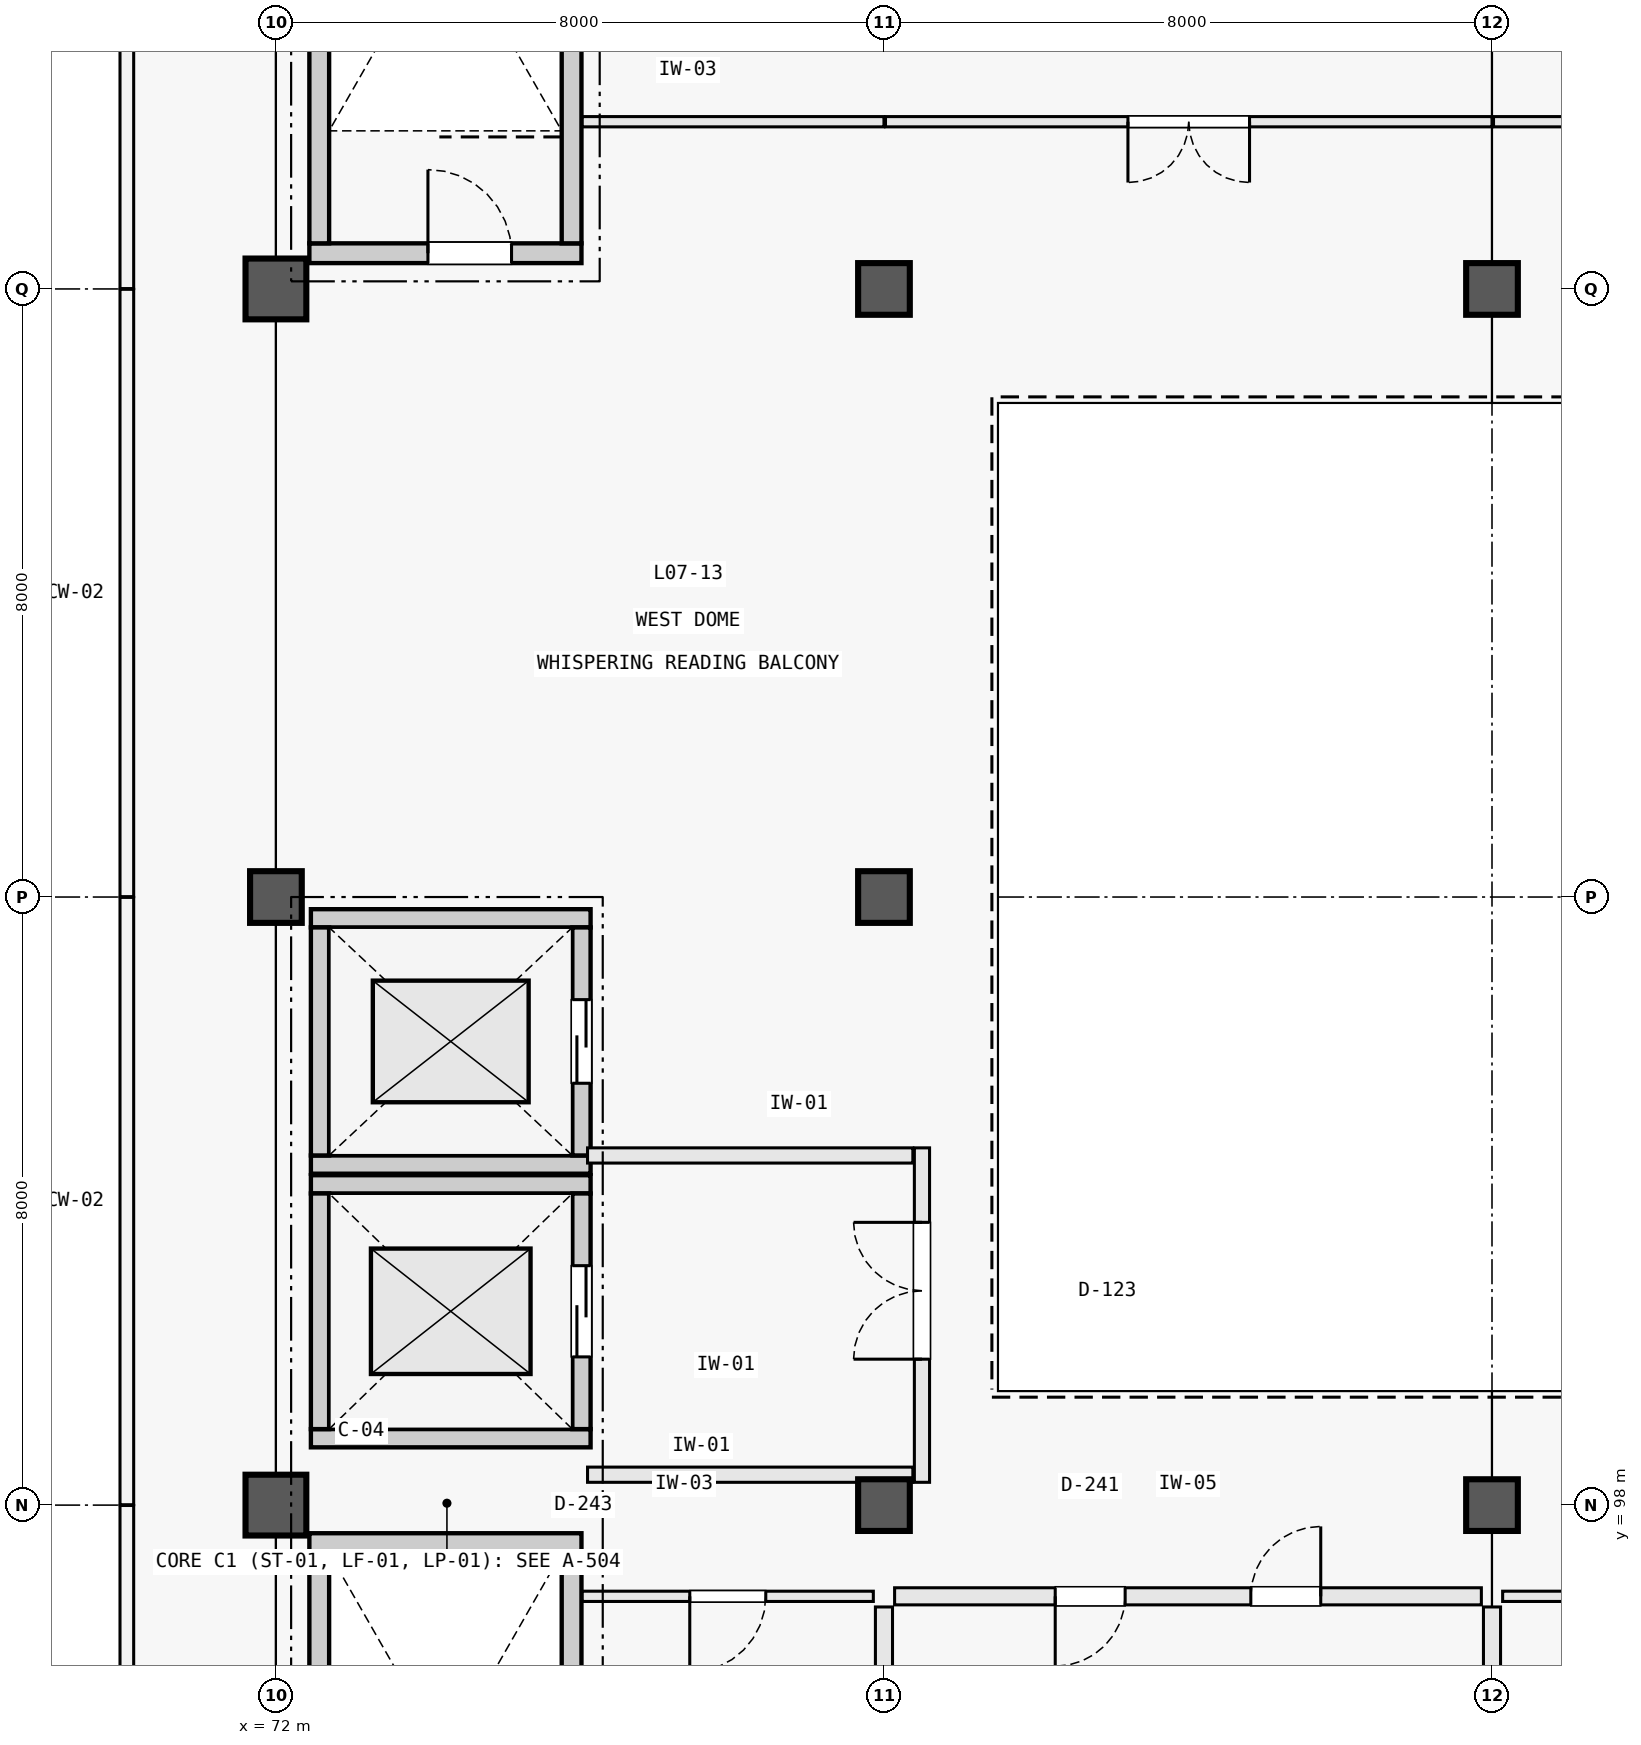
"""IFC4 building model, lengths in metres.
Left out: names, types, materials, properties, quantities, classifications, styles, units other than length and angle.
Written with IfcOpenShell. Run it as: python <this file> out.ifc"""

import sys

from ifc_helpers import new_model, si_unit, direction, frame, frame_2d, origin, origin_2d, place, context, subcontext, project, spatial, rectangle, circle, extrude, element, fill, save


model = new_model("IFC4")
c1 = context("Model", 3, precision=1e-05, world=origin(), true_north=direction((0.0, 1.0)))
c2 = subcontext(c1, "Body", "Model", "MODEL_VIEW")
j1 = project(units=[si_unit("LENGTHUNIT", "METRE"), si_unit("PLANEANGLEUNIT", "RADIAN")], contexts=[c1])
p1 = place(None, origin())
s1 = spatial("IfcSite", under=j1, at=p1, CompositionType="ELEMENT")
p2 = place(p1, origin())
s2 = spatial("IfcBuilding", under=s1, at=p2, CompositionType="ELEMENT")
p3 = place(p2, frame((0.0, 0.0, 30.3)))
s3 = spatial("IfcBuildingStorey", under=s2, at=p3, CompositionType="ELEMENT", Elevation=30.3)
p4 = place(p3, frame((72.0, 98.0, 0.0), z_axis=(0.0, 0.0, 1.0), x_axis=(1.0, 0.0, 0.0)))
e1 = element("IfcColumn", 1, at=p4, inside=s3, PredefinedType="COLUMN", context=c2, shape_type="SweptSolid", body=[
    extrude(rectangle(XDim=0.8, YDim=0.8, at=origin_2d()), origin(), (0.0, 0.0, 1.0), 4.5),
])
p5 = place(p3, frame((72.0, 106.0, 0.0), z_axis=(0.0, 0.0, 1.0), x_axis=(1.0, 0.0, 0.0)))
e2 = element("IfcColumn", 2, at=p5, inside=s3, PredefinedType="COLUMN", context=c2, shape_type="SweptSolid", body=[
    extrude(circle(Radius=0.34, at=origin_2d()), origin(), (0.0, 0.0, 1.0), 4.5),
])
p6 = place(p3, frame((72.0, 114.0, 0.0), z_axis=(0.0, 0.0, 1.0), x_axis=(1.0, 0.0, 0.0)))
e3 = element("IfcColumn", 3, at=p6, inside=s3, PredefinedType="COLUMN", context=c2, shape_type="SweptSolid", body=[
    extrude(rectangle(XDim=0.8, YDim=0.8, at=origin_2d()), origin(), (0.0, 0.0, 1.0), 4.5),
])
for number, where, z_axis, x_axis in (
    (4, (80.0, 98.0, 0.0), (0.0, 0.0, 1.0), (1.0, 0.0, 0.0)),
    (5, (80.0, 106.0, 0.0), (0.0, 0.0, 1.0), (1.0, 0.0, 0.0)),
    (6, (80.0, 114.0, 0.0), (0.0, 0.0, 1.0), (1.0, 0.0, 0.0)),
    (7, (88.0, 98.0, 0.0), (0.0, 0.0, 1.0), (1.0, 0.0, 0.0)),
    (8, (88.0, 114.0, 0.0), (0.0, 0.0, 1.0), (1.0, 0.0, 0.0)),
):
    element("IfcColumn", number, at=place(p3, frame(where, z_axis=z_axis, x_axis=x_axis)), inside=s3, PredefinedType="COLUMN", context=c2, shape_type="SweptSolid", body=[
        extrude(circle(Radius=0.34, at=origin_2d()), origin(), (0.0, 0.0, 1.0), 4.5),
    ])
p7 = place(p3, frame((72.44, 97.5, 0.0), z_axis=(0.0, 0.0, 1.0), x_axis=(1.0, 0.0, 0.0)))
e9 = element("IfcWall", 9, at=p7, inside=s3, PredefinedType="SOLIDWALL", context=c2, shape_type="SweptSolid", body=[
    extrude(rectangle(XDim=3.58, YDim=0.26, at=frame_2d((1.79, 0.0))), origin(), (0.0, 0.0, 1.0), 4.5),
])
for number, where, z_axis, x_axis in (
    (10, (72.57, 90.55, 0.0), (0.0, 0.0, 1.0), (0.0, 1.0, 0.0)),
    (11, (75.89, 90.55, 0.0), (0.0, 0.0, 1.0), (0.0, 1.0, 0.0)),
):
    element("IfcWall", number, at=place(p3, frame(where, z_axis=z_axis, x_axis=x_axis)), inside=s3, PredefinedType="SOLIDWALL", context=c2, shape_type="SweptSolid", body=[
        extrude(rectangle(XDim=6.82, YDim=0.26, at=frame_2d((3.41, 0.0))), origin(), (0.0, 0.0, 1.0), 4.5),
    ])
p8 = place(p3, frame((72.44, 114.47, 0.0), z_axis=(0.0, 0.0, 1.0), x_axis=(1.0, 0.0, 0.0)))
e12 = element("IfcWall", 12, at=p8, inside=s3, PredefinedType="SOLIDWALL", context=c2, shape_type="SweptSolid", body=[
    extrude(rectangle(XDim=3.58, YDim=0.26, at=frame_2d((1.79, 0.0))), origin(), (0.0, 0.0, 1.0), 4.5),
])
p9 = place(p8, frame((1.56, 0.0, 0.0)))
e13 = element("IfcOpeningElement", 13, at=p9, cuts=e12, PredefinedType="OPENING", context=c2, shape_type="SweptSolid", body=[
    extrude(rectangle(XDim=1.1, YDim=2.2, at=frame_2d((0.55, 1.1))), frame((0.0, 0.142, 0.0), z_axis=(0.0, -1.0, 0.0), x_axis=(1.0, 0.0, 0.0)), (0.0, 0.0, 1.0), 0.284),
])
for number, where, z_axis, x_axis in (
    (14, (72.57, 114.6, 0.0), (0.0, 0.0, 1.0), (0.0, 1.0, 0.0)),
    (15, (75.89, 114.6, 0.0), (0.0, 0.0, 1.0), (0.0, 1.0, 0.0)),
):
    element("IfcWall", number, at=place(p3, frame(where, z_axis=z_axis, x_axis=x_axis)), inside=s3, PredefinedType="SOLIDWALL", context=c2, shape_type="SweptSolid", body=[
        extrude(rectangle(XDim=6.82, YDim=0.26, at=frame_2d((3.41, 0.0))), origin(), (0.0, 0.0, 1.0), 4.5),
    ])
for number, where, z_axis, x_axis in (
    (16, (72.46, 98.88, 0.0), (0.0, 0.0, 1.0), (1.0, 0.0, 0.0)),
    (17, (72.46, 102.22, 0.0), (0.0, 0.0, 1.0), (1.0, 0.0, 0.0)),
):
    element("IfcWall", number, at=place(p3, frame(where, z_axis=z_axis, x_axis=x_axis)), inside=s3, PredefinedType="SOLIDWALL", context=c2, shape_type="SweptSolid", body=[
        extrude(rectangle(XDim=3.68, YDim=0.24, at=frame_2d((1.84, 0.0))), origin(), (0.0, 0.0, 1.0), 4.5),
    ])
p10 = place(p3, frame((72.58, 99.0, 0.0), z_axis=(0.0, 0.0, 1.0), x_axis=(0.0, 1.0, 0.0)))
e18 = element("IfcWall", 18, at=p10, inside=s3, PredefinedType="SOLIDWALL", context=c2, shape_type="SweptSolid", body=[
    extrude(rectangle(XDim=3.1, YDim=0.24, at=frame_2d((1.55, 0.0))), origin(), (0.0, 0.0, 1.0), 4.5),
])
p11 = place(p3, frame((76.02, 99.0, 0.0), z_axis=(0.0, 0.0, 1.0), x_axis=(0.0, 1.0, 0.0)))
e19 = element("IfcWall", 19, at=p11, inside=s3, PredefinedType="SOLIDWALL", context=c2, shape_type="SweptSolid", body=[
    extrude(rectangle(XDim=3.1, YDim=0.24, at=frame_2d((1.55, 0.0))), origin(), (0.0, 0.0, 1.0), 4.5),
])
p12 = place(p11, frame((0.95, 0.0, 0.0)))
e20 = element("IfcOpeningElement", 20, at=p12, cuts=e19, PredefinedType="OPENING", context=c2, shape_type="SweptSolid", body=[
    extrude(rectangle(XDim=1.2, YDim=2.2, at=frame_2d((0.6, 1.1))), frame((0.0, 0.132, 0.0), z_axis=(0.0, -1.0, 0.0), x_axis=(1.0, 0.0, 0.0)), (0.0, 0.0, 1.0), 0.264),
])
for number, where, z_axis, x_axis in (
    (21, (72.46, 102.48, 0.0), (0.0, 0.0, 1.0), (1.0, 0.0, 0.0)),
    (22, (72.46, 105.72, 0.0), (0.0, 0.0, 1.0), (1.0, 0.0, 0.0)),
):
    element("IfcWall", number, at=place(p3, frame(where, z_axis=z_axis, x_axis=x_axis)), inside=s3, PredefinedType="SOLIDWALL", context=c2, shape_type="SweptSolid", body=[
        extrude(rectangle(XDim=3.68, YDim=0.24, at=frame_2d((1.84, 0.0))), origin(), (0.0, 0.0, 1.0), 4.5),
    ])
p13 = place(p3, frame((72.58, 102.6, 0.0), z_axis=(0.0, 0.0, 1.0), x_axis=(0.0, 1.0, 0.0)))
e23 = element("IfcWall", 23, at=p13, inside=s3, PredefinedType="SOLIDWALL", context=c2, shape_type="SweptSolid", body=[
    extrude(rectangle(XDim=3.0, YDim=0.24, at=frame_2d((1.5, 0.0))), origin(), (0.0, 0.0, 1.0), 4.5),
])
p14 = place(p3, frame((76.02, 102.6, 0.0), z_axis=(0.0, 0.0, 1.0), x_axis=(0.0, 1.0, 0.0)))
e24 = element("IfcWall", 24, at=p14, inside=s3, PredefinedType="SOLIDWALL", context=c2, shape_type="SweptSolid", body=[
    extrude(rectangle(XDim=3.0, YDim=0.24, at=frame_2d((1.5, 0.0))), origin(), (0.0, 0.0, 1.0), 4.5),
])
p15 = place(p14, frame((0.95, 0.0, 0.0)))
e25 = element("IfcOpeningElement", 25, at=p15, cuts=e24, PredefinedType="OPENING", context=c2, shape_type="SweptSolid", body=[
    extrude(rectangle(XDim=1.1, YDim=2.2, at=frame_2d((0.55, 1.1))), frame((0.0, 0.132, 0.0), z_axis=(0.0, -1.0, 0.0), x_axis=(1.0, 0.0, 0.0)), (0.0, 0.0, 1.0), 0.264),
])
for number, where, z_axis, x_axis in (
    (26, (76.1, 98.4, 0.0), (0.0, 0.0, 1.0), (1.0, 0.0, 0.0)),
    (27, (76.1, 102.6, 0.0), (0.0, 0.0, 1.0), (1.0, 0.0, 0.0)),
):
    element("IfcWall", number, at=place(p3, frame(where, z_axis=z_axis, x_axis=x_axis)), inside=s3, PredefinedType="PARTITIONING", context=c2, shape_type="SweptSolid", body=[
        extrude(rectangle(XDim=4.28, YDim=0.2, at=frame_2d((2.14, 0.0))), origin(), (0.0, 0.0, 1.0), 3.28),
    ])
p16 = place(p3, frame((80.5, 98.3, 0.0), z_axis=(0.0, 0.0, 1.0), x_axis=(0.0, 1.0, 0.0)))
e28 = element("IfcWall", 28, at=p16, inside=s3, PredefinedType="PARTITIONING", context=c2, shape_type="SweptSolid", body=[
    extrude(rectangle(XDim=4.4, YDim=0.2, at=frame_2d((2.2, 0.0))), origin(), (0.0, 0.0, 1.0), 3.28),
])
p17 = place(p16, frame((1.62, 0.0, 0.0)))
e29 = element("IfcOpeningElement", 29, at=p17, cuts=e28, PredefinedType="OPENING", context=c2, shape_type="SweptSolid", body=[
    extrude(rectangle(XDim=1.8, YDim=2.25, at=frame_2d((0.9, 1.125))), frame((0.0, 0.112, 0.0), z_axis=(0.0, -1.0, 0.0), x_axis=(1.0, 0.0, 0.0)), (0.0, 0.0, 1.0), 0.224),
])
p18 = place(p3, frame((80.0, 90.41, 0.0), z_axis=(0.0, 0.0, 1.0), x_axis=(0.0, 1.0, 0.0)))
e30 = element("IfcWall", 30, at=p18, inside=s3, PredefinedType="PARTITIONING", context=c2, shape_type="SweptSolid", body=[
    extrude(rectangle(XDim=6.25, YDim=0.225, at=frame_2d((3.125, 0.0))), origin(), (0.0, 0.0, 1.0), 3.11),
])
p19 = place(p3, frame((88.0, 90.35, 0.0), z_axis=(0.0, 0.0, 1.0), x_axis=(0.0, 1.0, 0.0)))
e31 = element("IfcWall", 31, at=p19, inside=s3, PredefinedType="PARTITIONING", context=c2, shape_type="SweptSolid", body=[
    extrude(rectangle(XDim=6.31, YDim=0.225, at=frame_2d((3.155, 0.0))), origin(), (0.0, 0.0, 1.0), 3.11),
])
p20 = place(p3, frame((80.14, 96.8, 0.0), z_axis=(0.0, 0.0, 1.0), x_axis=(1.0, 0.0, 0.0)))
e32 = element("IfcWall", 32, at=p20, inside=s3, PredefinedType="PARTITIONING", context=c2, shape_type="SweptSolid", body=[
    extrude(rectangle(XDim=7.72, YDim=0.225, at=frame_2d((3.86, 0.0))), origin(), (0.0, 0.0, 1.0), 3.11),
])
p21 = place(p20, frame((2.113, 0.0, 0.0)))
e33 = element("IfcOpeningElement", 33, at=p21, cuts=e32, PredefinedType="OPENING", context=c2, shape_type="SweptSolid", body=[
    extrude(rectangle(XDim=0.92, YDim=2.1, at=frame_2d((0.46, 1.05))), frame((0.0, 0.125, 0.0), z_axis=(0.0, -1.0, 0.0), x_axis=(1.0, 0.0, 0.0)), (0.0, 0.0, 1.0), 0.249),
])
p22 = place(p20, frame((4.687, 0.0, 0.0)))
e34 = element("IfcOpeningElement", 34, at=p22, cuts=e32, PredefinedType="OPENING", context=c2, shape_type="SweptSolid", body=[
    extrude(rectangle(XDim=0.92, YDim=2.1, at=frame_2d((0.46, 1.05))), frame((0.0, 0.125, 0.0), z_axis=(0.0, -1.0, 0.0), x_axis=(1.0, 0.0, 0.0)), (0.0, 0.0, 1.0), 0.249),
])
p23 = place(p3, frame((76.03, 96.8, 0.0), z_axis=(0.0, 0.0, 1.0), x_axis=(1.0, 0.0, 0.0)))
e35 = element("IfcWall", 35, at=p23, inside=s3, PredefinedType="PARTITIONING", context=c2, shape_type="SweptSolid", body=[
    extrude(rectangle(XDim=3.83, YDim=0.135, at=frame_2d((1.915, 0.0))), origin(), (0.0, 0.0, 1.0), 3.11),
])
p24 = place(p23, frame((1.415, 0.0, 0.0)))
e36 = element("IfcOpeningElement", 36, at=p24, cuts=e35, PredefinedType="OPENING", context=c2, shape_type="SweptSolid", body=[
    extrude(rectangle(XDim=1.0, YDim=2.15, at=frame_2d((0.5, 1.075))), frame((0.0, 0.08, 0.0), z_axis=(0.0, -1.0, 0.0), x_axis=(1.0, 0.0, 0.0)), (0.0, 0.0, 1.0), 0.159),
])
p25 = place(p3, frame((88.14, 96.8, 0.0), z_axis=(0.0, 0.0, 1.0), x_axis=(1.0, 0.0, 0.0)))
e37 = element("IfcWall", 37, at=p25, inside=s3, PredefinedType="PARTITIONING", context=c2, shape_type="SweptSolid", body=[
    extrude(rectangle(XDim=7.86, YDim=0.135, at=frame_2d((3.93, 0.0))), origin(), (0.0, 0.0, 1.0), 3.11),
])
p26 = place(p25, frame((3.13, 0.0, 0.0)))
e38 = element("IfcOpeningElement", 38, at=p26, cuts=e37, PredefinedType="OPENING", context=c2, shape_type="SweptSolid", body=[
    extrude(rectangle(XDim=1.6, YDim=2.2, at=frame_2d((0.8, 1.1))), frame((0.0, 0.08, 0.0), z_axis=(0.0, -1.0, 0.0), x_axis=(1.0, 0.0, 0.0)), (0.0, 0.0, 1.0), 0.159),
])
p27 = place(p3, frame((76.03, 116.2, 0.0), z_axis=(0.0, 0.0, 1.0), x_axis=(1.0, 0.0, 0.0)))
e39 = element("IfcWall", 39, at=p27, inside=s3, PredefinedType="PARTITIONING", context=c2, shape_type="SweptSolid", body=[
    extrude(rectangle(XDim=3.97, YDim=0.135, at=frame_2d((1.985, 0.0))), origin(), (0.0, 0.0, 1.0), 3.11),
])
p28 = place(p3, frame((80.02, 116.2, 0.0), z_axis=(0.0, 0.0, 1.0), x_axis=(1.0, 0.0, 0.0)))
e40 = element("IfcWall", 40, at=p28, inside=s3, PredefinedType="PARTITIONING", context=c2, shape_type="SweptSolid", body=[
    extrude(rectangle(XDim=7.98, YDim=0.135, at=frame_2d((3.99, 0.0))), origin(), (0.0, 0.0, 1.0), 3.11),
])
p29 = place(p28, frame((3.19, 0.0, 0.0)))
e41 = element("IfcOpeningElement", 41, at=p29, cuts=e40, PredefinedType="OPENING", context=c2, shape_type="SweptSolid", body=[
    extrude(rectangle(XDim=1.6, YDim=2.2, at=frame_2d((0.8, 1.1))), frame((0.0, 0.08, 0.0), z_axis=(0.0, -1.0, 0.0), x_axis=(1.0, 0.0, 0.0)), (0.0, 0.0, 1.0), 0.159),
])
p30 = place(p3, frame((88.02, 116.2, 0.0), z_axis=(0.0, 0.0, 1.0), x_axis=(1.0, 0.0, 0.0)))
e42 = element("IfcWall", 42, at=p30, inside=s3, PredefinedType="PARTITIONING", context=c2, shape_type="SweptSolid", body=[
    extrude(rectangle(XDim=7.98, YDim=0.135, at=frame_2d((3.99, 0.0))), origin(), (0.0, 0.0, 1.0), 3.11),
])
p31 = place(p30, frame((3.515, 0.0, 0.0)))
e43 = element("IfcOpeningElement", 43, at=p31, cuts=e42, PredefinedType="OPENING", context=c2, shape_type="SweptSolid", body=[
    extrude(rectangle(XDim=0.95, YDim=2.15, at=frame_2d((0.475, 1.075))), frame((0.0, 0.08, 0.0), z_axis=(0.0, -1.0, 0.0), x_axis=(1.0, 0.0, 0.0)), (0.0, 0.0, 1.0), 0.159),
])
p32 = place(p9, origin())
e44 = element("IfcDoor", 44, at=p32, inside=s3, OperationType="SINGLE_SWING_LEFT", PredefinedType="DOOR", context=c2, shape_type="SweptSolid", body=[
    extrude(rectangle(XDim=1.1, YDim=2.2, at=frame_2d((0.55, 1.1))), frame((0.0, 0.025, 0.0), z_axis=(0.0, -1.0, 0.0), x_axis=(1.0, 0.0, 0.0)), (0.0, 0.0, 1.0), 0.05),
])
fill(e13, e44)
p33 = place(p12, origin())
e45 = element("IfcDoor", 45, at=p33, inside=s3, OperationType="DOUBLE_DOOR_SLIDING", PredefinedType="DOOR", context=c2, shape_type="SweptSolid", body=[
    extrude(rectangle(XDim=1.2, YDim=2.2, at=frame_2d((0.6, 1.1))), frame((0.0, 0.025, 0.0), z_axis=(0.0, -1.0, 0.0), x_axis=(1.0, 0.0, 0.0)), (0.0, 0.0, 1.0), 0.05),
])
fill(e20, e45)
p34 = place(p15, origin())
e46 = element("IfcDoor", 46, at=p34, inside=s3, OperationType="DOUBLE_DOOR_SLIDING", PredefinedType="DOOR", context=c2, shape_type="SweptSolid", body=[
    extrude(rectangle(XDim=1.1, YDim=2.2, at=frame_2d((0.55, 1.1))), frame((0.0, 0.025, 0.0), z_axis=(0.0, -1.0, 0.0), x_axis=(1.0, 0.0, 0.0)), (0.0, 0.0, 1.0), 0.05),
])
fill(e25, e46)
p35 = place(p17, origin())
e47 = element("IfcDoor", 47, at=p35, inside=s3, OperationType="DOUBLE_DOOR_SINGLE_SWING", PredefinedType="DOOR", context=c2, shape_type="SweptSolid", body=[
    extrude(rectangle(XDim=1.8, YDim=2.25, at=frame_2d((0.9, 1.125))), frame((0.0, 0.025, 0.0), z_axis=(0.0, -1.0, 0.0), x_axis=(1.0, 0.0, 0.0)), (0.0, 0.0, 1.0), 0.05),
])
fill(e29, e47)
p36 = place(p21, frame((0.92, 0.0, 0.0), z_axis=(0.0, 0.0, 1.0), x_axis=(-1.0, 0.0, 0.0)))
e48 = element("IfcDoor", 48, at=p36, inside=s3, OperationType="SINGLE_SWING_LEFT", PredefinedType="DOOR", context=c2, shape_type="SweptSolid", body=[
    extrude(rectangle(XDim=0.92, YDim=2.1, at=frame_2d((0.46, 1.05))), frame((0.0, 0.025, 0.0), z_axis=(0.0, -1.0, 0.0), x_axis=(1.0, 0.0, 0.0)), (0.0, 0.0, 1.0), 0.05),
])
fill(e33, e48)
p37 = place(p22, origin())
e49 = element("IfcDoor", 49, at=p37, inside=s3, OperationType="SINGLE_SWING_RIGHT", PredefinedType="DOOR", context=c2, shape_type="SweptSolid", body=[
    extrude(rectangle(XDim=0.92, YDim=2.1, at=frame_2d((0.46, 1.05))), frame((0.0, 0.025, 0.0), z_axis=(0.0, -1.0, 0.0), x_axis=(1.0, 0.0, 0.0)), (0.0, 0.0, 1.0), 0.05),
])
fill(e34, e49)
p38 = place(p24, frame((1.0, 0.0, 0.0), z_axis=(0.0, 0.0, 1.0), x_axis=(-1.0, 0.0, 0.0)))
e50 = element("IfcDoor", 50, at=p38, inside=s3, OperationType="SINGLE_SWING_LEFT", PredefinedType="DOOR", context=c2, shape_type="SweptSolid", body=[
    extrude(rectangle(XDim=1.0, YDim=2.15, at=frame_2d((0.5, 1.075))), frame((0.0, 0.025, 0.0), z_axis=(0.0, -1.0, 0.0), x_axis=(1.0, 0.0, 0.0)), (0.0, 0.0, 1.0), 0.05),
])
fill(e36, e50)
p39 = place(p29, frame((1.6, 0.0, 0.0), z_axis=(0.0, 0.0, 1.0), x_axis=(-1.0, 0.0, 0.0)))
e51 = element("IfcDoor", 51, at=p39, inside=s3, OperationType="DOUBLE_DOOR_SINGLE_SWING", PredefinedType="DOOR", context=c2, shape_type="SweptSolid", body=[
    extrude(rectangle(XDim=1.6, YDim=2.2, at=frame_2d((0.8, 1.1))), frame((0.0, 0.025, 0.0), z_axis=(0.0, -1.0, 0.0), x_axis=(1.0, 0.0, 0.0)), (0.0, 0.0, 1.0), 0.05),
])
fill(e41, e51)
save(model, sys.argv[1])
